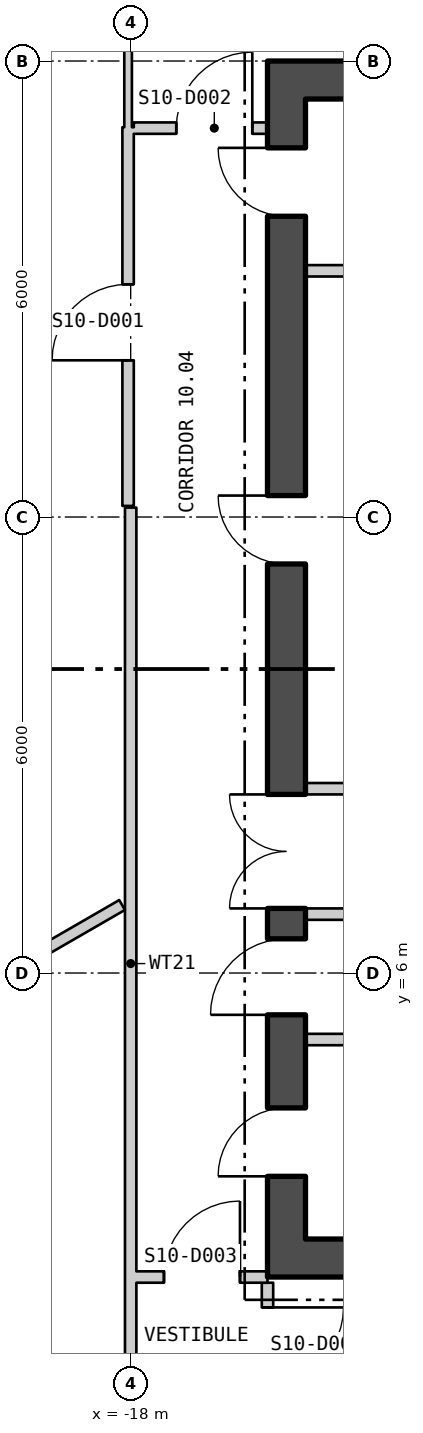
"""IFC4 building model, lengths in metres.
Left out: names, types, materials, properties, quantities, classifications, styles, units other than length and angle.
Written with IfcOpenShell. Run it as: python <this file> out.ifc"""

import sys

from ifc_helpers import new_model, si_unit, direction, frame, frame_2d, origin, place, context, subcontext, project, spatial, polyline, rectangle, outline, extrude, element, fill, save


model = new_model("IFC4")
c1 = context("Model", 3, precision=1e-05, world=origin(), true_north=direction((0.0, 1.0)))
c2 = subcontext(c1, "Body", "Model", "MODEL_VIEW")
j1 = project(units=[si_unit("LENGTHUNIT", "METRE"), si_unit("PLANEANGLEUNIT", "RADIAN")], contexts=[c1])
p1 = place(None, origin())
s1 = spatial("IfcSite", under=j1, at=p1, CompositionType="ELEMENT")
p2 = place(p1, origin())
s2 = spatial("IfcBuilding", under=s1, at=p2, CompositionType="ELEMENT")
p3 = place(p2, frame((0.0, 0.0, 139.8)))
s3 = spatial("IfcBuildingStorey", under=s2, at=p3, CompositionType="ELEMENT", Elevation=139.8)
p4 = place(p3, frame((-27.235, 12.423, -0.18), z_axis=(0.0, 0.0, 1.0), x_axis=(0.500000335318, -0.866025210188, 0.0)))
e1 = element("IfcWall", 1, at=p4, inside=s3, PredefinedType="SOLIDWALL", context=c2, shape_type="SweptSolid", body=[
    extrude(outline(polyline([(-0.13, -0.225), (45.88, -0.225), (45.62, 0.225), (0.13, 0.225), (-0.13, -0.225)])), origin(), (0.0, 0.0, 1.0), 3.68),
])
p5 = place(p4, frame((1.425, 0.0, 1.08)))
e2 = element("IfcOpeningElement", 2, at=p5, cuts=e1, PredefinedType="OPENING", context=c2, shape_type="SweptSolid", body=[
    extrude(rectangle(XDim=2.4, YDim=2.0, at=frame_2d((1.2, 1.0))), frame((0.0, 0.235, 0.0), z_axis=(0.0, -1.0, 0.0), x_axis=(1.0, 0.0, 0.0)), (0.0, 0.0, 1.0), 0.47),
])
p6 = place(p4, frame((5.895, 0.0, 1.08)))
e3 = element("IfcOpeningElement", 3, at=p6, cuts=e1, PredefinedType="OPENING", context=c2, shape_type="SweptSolid", body=[
    extrude(rectangle(XDim=2.4, YDim=2.0, at=frame_2d((1.2, 1.0))), frame((0.0, 0.235, 0.0), z_axis=(0.0, -1.0, 0.0), x_axis=(1.0, 0.0, 0.0)), (0.0, 0.0, 1.0), 0.47),
])
p7 = place(p4, frame((10.403, 0.0, 1.08)))
e4 = element("IfcOpeningElement", 4, at=p7, cuts=e1, PredefinedType="OPENING", context=c2, shape_type="SweptSolid", body=[
    extrude(rectangle(XDim=2.4, YDim=2.0, at=frame_2d((1.2, 1.0))), frame((0.0, 0.235, 0.0), z_axis=(0.0, -1.0, 0.0), x_axis=(1.0, 0.0, 0.0)), (0.0, 0.0, 1.0), 0.47),
])
p8 = place(p4, frame((14.912, 0.0, 1.08)))
e5 = element("IfcOpeningElement", 5, at=p8, cuts=e1, PredefinedType="OPENING", context=c2, shape_type="SweptSolid", body=[
    extrude(rectangle(XDim=2.4, YDim=2.0, at=frame_2d((1.2, 1.0))), frame((0.0, 0.235, 0.0), z_axis=(0.0, -1.0, 0.0), x_axis=(1.0, 0.0, 0.0)), (0.0, 0.0, 1.0), 0.47),
])
p9 = place(p4, frame((19.421, 0.0, 1.08)))
e6 = element("IfcOpeningElement", 6, at=p9, cuts=e1, PredefinedType="OPENING", context=c2, shape_type="SweptSolid", body=[
    extrude(rectangle(XDim=2.4, YDim=2.0, at=frame_2d((1.2, 1.0))), frame((0.0, 0.235, 0.0), z_axis=(0.0, -1.0, 0.0), x_axis=(1.0, 0.0, 0.0)), (0.0, 0.0, 1.0), 0.47),
])
p10 = place(p4, frame((23.929, 0.0, 1.08)))
e7 = element("IfcOpeningElement", 7, at=p10, cuts=e1, PredefinedType="OPENING", context=c2, shape_type="SweptSolid", body=[
    extrude(rectangle(XDim=2.4, YDim=2.0, at=frame_2d((1.2, 1.0))), frame((0.0, 0.235, 0.0), z_axis=(0.0, -1.0, 0.0), x_axis=(1.0, 0.0, 0.0)), (0.0, 0.0, 1.0), 0.47),
])
p11 = place(p4, frame((28.438, 0.0, 1.08)))
e8 = element("IfcOpeningElement", 8, at=p11, cuts=e1, PredefinedType="OPENING", context=c2, shape_type="SweptSolid", body=[
    extrude(rectangle(XDim=2.4, YDim=2.0, at=frame_2d((1.2, 1.0))), frame((0.0, 0.235, 0.0), z_axis=(0.0, -1.0, 0.0), x_axis=(1.0, 0.0, 0.0)), (0.0, 0.0, 1.0), 0.47),
])
p12 = place(p4, frame((32.947, 0.0, 1.08)))
e9 = element("IfcOpeningElement", 9, at=p12, cuts=e1, PredefinedType="OPENING", context=c2, shape_type="SweptSolid", body=[
    extrude(rectangle(XDim=2.4, YDim=2.0, at=frame_2d((1.2, 1.0))), frame((0.0, 0.235, 0.0), z_axis=(0.0, -1.0, 0.0), x_axis=(1.0, 0.0, 0.0)), (0.0, 0.0, 1.0), 0.47),
])
p13 = place(p4, frame((37.455, 0.0, 1.08)))
e10 = element("IfcOpeningElement", 10, at=p13, cuts=e1, PredefinedType="OPENING", context=c2, shape_type="SweptSolid", body=[
    extrude(rectangle(XDim=2.4, YDim=2.0, at=frame_2d((1.2, 1.0))), frame((0.0, 0.235, 0.0), z_axis=(0.0, -1.0, 0.0), x_axis=(1.0, 0.0, 0.0)), (0.0, 0.0, 1.0), 0.47),
])
p14 = place(p4, frame((41.925, 0.0, 1.08)))
e11 = element("IfcOpeningElement", 11, at=p14, cuts=e1, PredefinedType="OPENING", context=c2, shape_type="SweptSolid", body=[
    extrude(rectangle(XDim=2.4, YDim=2.0, at=frame_2d((1.2, 1.0))), frame((0.0, 0.235, 0.0), z_axis=(0.0, -1.0, 0.0), x_axis=(1.0, 0.0, 0.0)), (0.0, 0.0, 1.0), 0.47),
])
p15 = place(p3, frame((-16.2, 2.25, 0.0), z_axis=(0.0, 0.0, 1.0), x_axis=(1.0, 0.0, 0.0)))
e12 = element("IfcWall", 12, at=p15, inside=s3, PredefinedType="SHEAR", context=c2, shape_type="SweptSolid", body=[
    extrude(rectangle(XDim=32.4, YDim=0.5, at=frame_2d((16.2, 0.0))), origin(), (0.0, 0.0, 1.0), 3.7),
])
p16 = place(p15, frame((10.7, 0.0, 0.0)))
e13 = element("IfcOpeningElement", 13, at=p16, cuts=e12, PredefinedType="OPENING", context=c2, shape_type="SweptSolid", body=[
    extrude(rectangle(XDim=1.8, YDim=2.4, at=frame_2d((0.9, 1.2))), frame((0.0, 0.26, 0.0), z_axis=(0.0, -1.0, 0.0), x_axis=(1.0, 0.0, 0.0)), (0.0, 0.0, 1.0), 0.52),
])
p17 = place(p15, frame((20.7, 0.0, 0.0)))
e14 = element("IfcOpeningElement", 14, at=p17, cuts=e12, PredefinedType="OPENING", context=c2, shape_type="SweptSolid", body=[
    extrude(rectangle(XDim=1.8, YDim=2.4, at=frame_2d((0.9, 1.2))), frame((0.0, 0.26, 0.0), z_axis=(0.0, -1.0, 0.0), x_axis=(1.0, 0.0, 0.0)), (0.0, 0.0, 1.0), 0.52),
])
p18 = place(p3, frame((-16.2, 17.75, 0.0), z_axis=(0.0, 0.0, 1.0), x_axis=(1.0, 0.0, 0.0)))
e15 = element("IfcWall", 15, at=p18, inside=s3, PredefinedType="SHEAR", context=c2, shape_type="SweptSolid", body=[
    extrude(rectangle(XDim=32.4, YDim=0.5, at=frame_2d((16.2, 0.0))), origin(), (0.0, 0.0, 1.0), 3.7),
])
p19 = place(p3, frame((-15.95, 2.5, 0.0), z_axis=(0.0, 0.0, 1.0), x_axis=(0.0, 1.0, 0.0)))
e16 = element("IfcWall", 16, at=p19, inside=s3, PredefinedType="SHEAR", context=c2, shape_type="SweptSolid", body=[
    extrude(rectangle(XDim=15.0, YDim=0.5, at=frame_2d((7.5, 0.0))), origin(), (0.0, 0.0, 1.0), 3.7),
])
p20 = place(p19, frame((4.35, 0.0, 0.0)))
e17 = element("IfcOpeningElement", 17, at=p20, cuts=e16, PredefinedType="OPENING", context=c2, shape_type="SweptSolid", body=[
    extrude(rectangle(XDim=1.5, YDim=2.1, at=frame_2d((0.75, 1.05))), frame((0.0, 0.26, 0.0), z_axis=(0.0, -1.0, 0.0), x_axis=(1.0, 0.0, 0.0)), (0.0, 0.0, 1.0), 0.52),
])
p21 = place(p19, frame((0.825, 0.0, 0.0)))
e18 = element("IfcOpeningElement", 18, at=p21, cuts=e16, PredefinedType="OPENING", context=c2, shape_type="SweptSolid", body=[
    extrude(rectangle(XDim=0.9, YDim=2.1, at=frame_2d((0.45, 1.05))), frame((0.0, 0.26, 0.0), z_axis=(0.0, -1.0, 0.0), x_axis=(1.0, 0.0, 0.0)), (0.0, 0.0, 1.0), 0.52),
])
p22 = place(p19, frame((2.95, 0.0, 0.0)))
e19 = element("IfcOpeningElement", 19, at=p22, cuts=e16, PredefinedType="OPENING", context=c2, shape_type="SweptSolid", body=[
    extrude(rectangle(XDim=1.0, YDim=2.1, at=frame_2d((0.5, 1.05))), frame((0.0, 0.26, 0.0), z_axis=(0.0, -1.0, 0.0), x_axis=(1.0, 0.0, 0.0)), (0.0, 0.0, 1.0), 0.52),
])
p23 = place(p19, frame((8.882, 0.0, 0.0)))
e20 = element("IfcOpeningElement", 20, at=p23, cuts=e16, PredefinedType="OPENING", context=c2, shape_type="SweptSolid", body=[
    extrude(rectangle(XDim=0.9, YDim=2.1, at=frame_2d((0.45, 1.05))), frame((0.0, 0.26, 0.0), z_axis=(0.0, -1.0, 0.0), x_axis=(1.0, 0.0, 0.0)), (0.0, 0.0, 1.0), 0.52),
])
p24 = place(p19, frame((13.457, 0.0, 0.0)))
e21 = element("IfcOpeningElement", 21, at=p24, cuts=e16, PredefinedType="OPENING", context=c2, shape_type="SweptSolid", body=[
    extrude(rectangle(XDim=0.9, YDim=2.1, at=frame_2d((0.45, 1.05))), frame((0.0, 0.26, 0.0), z_axis=(0.0, -1.0, 0.0), x_axis=(1.0, 0.0, 0.0)), (0.0, 0.0, 1.0), 0.52),
])
for number, where, z_axis, x_axis in (
    (22, (-15.7, 6.775, 0.0), (0.0, 0.0, 1.0), (1.0, 0.0, 0.0)),
    (23, (-15.7, 8.425, 0.0), (0.0, 0.0, 1.0), (1.0, 0.0, 0.0)),
    (24, (-15.7, 5.125, 0.0), (0.0, 0.0, 1.0), (1.0, 0.0, 0.0)),
    (25, (-15.7, 15.24, 0.0), (0.0, 0.0, 1.0), (1.0, 0.0, 0.0)),
):
    element("IfcWall", number, at=place(p3, frame(where, z_axis=z_axis, x_axis=x_axis)), inside=s3, PredefinedType="PARTITIONING", context=c2, shape_type="SweptSolid", body=[
        extrude(rectangle(XDim=1.2, YDim=0.15, at=frame_2d((0.6, 0.0))), origin(), (0.0, 0.0, 1.0), 3.7),
    ])
p25 = place(p3, frame((-21.976, 4.664, 0.0), z_axis=(0.0, 0.0, 1.0), x_axis=(0.865957845807, 0.500116995598, 0.0)))
e26 = element("IfcWall", 26, at=p25, inside=s3, PredefinedType="PARTITIONING", context=c2, shape_type="SweptSolid", body=[
    extrude(rectangle(XDim=4.461, YDim=0.15, at=frame_2d((2.231, 0.0))), origin(), (0.0, 0.0, 1.0), 3.7),
])
p26 = place(p3, frame((-18.034, 12.146, 0.0), z_axis=(0.0, 0.0, 1.0), x_axis=(0.0, 1.0, 0.0)))
e27 = element("IfcWall", 27, at=p26, inside=s3, PredefinedType="PARTITIONING", context=c2, shape_type="SweptSolid", body=[
    extrude(rectangle(XDim=4.983, YDim=0.15, at=frame_2d((2.491, 0.0))), origin(), (0.0, 0.0, 1.0), 3.7),
])
p27 = place(p26, frame((1.916, 0.0, 0.0)))
e28 = element("IfcOpeningElement", 28, at=p27, cuts=e27, PredefinedType="OPENING", context=c2, shape_type="SweptSolid", body=[
    extrude(rectangle(XDim=1.0, YDim=2.1, at=frame_2d((0.5, 1.05))), frame((0.0, 0.085, 0.0), z_axis=(0.0, -1.0, 0.0), x_axis=(1.0, 0.0, 0.0)), (0.0, 0.0, 1.0), 0.17),
])
p28 = place(p3, frame((-18.034, 17.129, 0.0), z_axis=(0.0, 0.0, 1.0), x_axis=(0.0, 1.0, 0.0)))
e29 = element("IfcWall", 29, at=p28, inside=s3, PredefinedType="PARTITIONING", context=c2, shape_type="SweptSolid", body=[
    extrude(rectangle(XDim=2.171, YDim=0.1, at=frame_2d((1.085, 0.0))), origin(), (0.0, 0.0, 1.0), 3.7),
])
p29 = place(p3, frame((-18.0, 0.125, 0.0), z_axis=(0.0, 0.0, 1.0), x_axis=(0.0, 1.0, 0.0)))
e30 = element("IfcWall", 30, at=p29, inside=s3, PredefinedType="PARTITIONING", context=c2, shape_type="SweptSolid", body=[
    extrude(rectangle(XDim=11.999, YDim=0.15, at=frame_2d((6.0, 0.0))), origin(), (0.0, 0.0, 1.0), 3.7),
])
p30 = place(p3, frame((-17.959, 17.117, 0.0), z_axis=(0.0, 0.0, 1.0), x_axis=(1.0, 0.0, 0.0)))
e31 = element("IfcWall", 31, at=p30, inside=s3, PredefinedType="PARTITIONING", context=c2, shape_type="SweptSolid", body=[
    extrude(rectangle(XDim=1.759, YDim=0.15, at=frame_2d((0.879, 0.0))), origin(), (0.0, 0.0, 1.0), 3.7),
])
p31 = place(p30, frame((0.559, 0.0, 0.0)))
e32 = element("IfcOpeningElement", 32, at=p31, cuts=e31, PredefinedType="OPENING", context=c2, shape_type="SweptSolid", body=[
    extrude(rectangle(XDim=1.0, YDim=2.1, at=frame_2d((0.5, 1.05))), frame((0.0, 0.085, 0.0), z_axis=(0.0, -1.0, 0.0), x_axis=(1.0, 0.0, 0.0)), (0.0, 0.0, 1.0), 0.17),
])
p32 = place(p3, frame((-17.925, 2.0, 0.0), z_axis=(0.0, 0.0, 1.0), x_axis=(1.0, 0.0, 0.0)))
e33 = element("IfcWall", 33, at=p32, inside=s3, PredefinedType="PARTITIONING", context=c2, shape_type="SweptSolid", body=[
    extrude(rectangle(XDim=1.725, YDim=0.15, at=frame_2d((0.863, 0.0))), origin(), (0.0, 0.0, 1.0), 3.11),
])
p33 = place(p32, frame((0.363, 0.0, 0.0)))
e34 = element("IfcOpeningElement", 34, at=p33, cuts=e33, PredefinedType="OPENING", context=c2, shape_type="SweptSolid", body=[
    extrude(rectangle(XDim=1.0, YDim=2.1, at=frame_2d((0.5, 1.05))), frame((0.0, 0.085, 0.0), z_axis=(0.0, -1.0, 0.0), x_axis=(1.0, 0.0, 0.0)), (0.0, 0.0, 1.0), 0.17),
])
p34 = place(p3, frame((-16.2, 0.275, 0.0), z_axis=(0.0, 0.0, 1.0), x_axis=(0.0, 1.0, 0.0)))
e35 = element("IfcWall", 35, at=p34, inside=s3, PredefinedType="PARTITIONING", context=c2, shape_type="SweptSolid", body=[
    extrude(rectangle(XDim=1.65, YDim=0.15, at=frame_2d((0.825, 0.0))), origin(), (0.0, 0.0, 1.0), 3.7),
])
p35 = place(p34, frame((0.325, 0.0, 0.0)))
e36 = element("IfcOpeningElement", 36, at=p35, cuts=e35, PredefinedType="OPENING", context=c2, shape_type="SweptSolid", body=[
    extrude(rectangle(XDim=1.0, YDim=2.1, at=frame_2d((0.5, 1.05))), frame((0.0, 0.085, 0.0), z_axis=(0.0, -1.0, 0.0), x_axis=(1.0, 0.0, 0.0)), (0.0, 0.0, 1.0), 0.17),
])
p36 = place(p20, origin())
e37 = element("IfcDoor", 37, at=p36, inside=s3, OperationType="DOUBLE_DOOR_SINGLE_SWING", PredefinedType="DOOR", context=c2, shape_type="SweptSolid", body=[
    extrude(rectangle(XDim=1.5, YDim=2.1, at=frame_2d((0.75, 1.05))), frame((0.0, 0.025, 0.0), z_axis=(0.0, -1.0, 0.0), x_axis=(1.0, 0.0, 0.0)), (0.0, 0.0, 1.0), 0.05),
])
fill(e17, e37)
p37 = place(p21, origin())
e38 = element("IfcDoor", 38, at=p37, inside=s3, OperationType="SINGLE_SWING_RIGHT", PredefinedType="DOOR", context=c2, shape_type="SweptSolid", body=[
    extrude(rectangle(XDim=0.9, YDim=2.1, at=frame_2d((0.45, 1.05))), frame((0.0, 0.025, 0.0), z_axis=(0.0, -1.0, 0.0), x_axis=(1.0, 0.0, 0.0)), (0.0, 0.0, 1.0), 0.05),
])
fill(e18, e38)
p38 = place(p22, origin())
e39 = element("IfcDoor", 39, at=p38, inside=s3, OperationType="SINGLE_SWING_RIGHT", PredefinedType="DOOR", context=c2, shape_type="SweptSolid", body=[
    extrude(rectangle(XDim=1.0, YDim=2.1, at=frame_2d((0.5, 1.05))), frame((0.0, 0.025, 0.0), z_axis=(0.0, -1.0, 0.0), x_axis=(1.0, 0.0, 0.0)), (0.0, 0.0, 1.0), 0.05),
])
fill(e19, e39)
p39 = place(p23, origin())
e40 = element("IfcDoor", 40, at=p39, inside=s3, OperationType="SINGLE_SWING_LEFT", PredefinedType="DOOR", context=c2, shape_type="SweptSolid", body=[
    extrude(rectangle(XDim=0.9, YDim=2.1, at=frame_2d((0.45, 1.05))), frame((0.0, 0.025, 0.0), z_axis=(0.0, -1.0, 0.0), x_axis=(1.0, 0.0, 0.0)), (0.0, 0.0, 1.0), 0.05),
])
fill(e20, e40)
p40 = place(p24, origin())
e41 = element("IfcDoor", 41, at=p40, inside=s3, OperationType="SINGLE_SWING_LEFT", PredefinedType="DOOR", context=c2, shape_type="SweptSolid", body=[
    extrude(rectangle(XDim=0.9, YDim=2.1, at=frame_2d((0.45, 1.05))), frame((0.0, 0.025, 0.0), z_axis=(0.0, -1.0, 0.0), x_axis=(1.0, 0.0, 0.0)), (0.0, 0.0, 1.0), 0.05),
])
fill(e21, e41)
p41 = place(p27, origin())
e42 = element("IfcDoor", 42, at=p41, inside=s3, OperationType="SINGLE_SWING_RIGHT", PredefinedType="DOOR", context=c2, shape_type="SweptSolid", body=[
    extrude(rectangle(XDim=1.0, YDim=2.1, at=frame_2d((0.5, 1.05))), frame((0.0, 0.025, 0.0), z_axis=(0.0, -1.0, 0.0), x_axis=(1.0, 0.0, 0.0)), (0.0, 0.0, 1.0), 0.05),
])
fill(e28, e42)
p42 = place(p31, origin())
e43 = element("IfcDoor", 43, at=p42, inside=s3, OperationType="SINGLE_SWING_LEFT", PredefinedType="DOOR", context=c2, shape_type="SweptSolid", body=[
    extrude(rectangle(XDim=1.0, YDim=2.1, at=frame_2d((0.5, 1.05))), frame((0.0, 0.025, 0.0), z_axis=(0.0, -1.0, 0.0), x_axis=(1.0, 0.0, 0.0)), (0.0, 0.0, 1.0), 0.05),
])
fill(e32, e43)
p43 = place(p33, origin())
e44 = element("IfcDoor", 44, at=p43, inside=s3, OperationType="SINGLE_SWING_LEFT", PredefinedType="DOOR", context=c2, shape_type="SweptSolid", body=[
    extrude(rectangle(XDim=1.0, YDim=2.1, at=frame_2d((0.5, 1.05))), frame((0.0, 0.025, 0.0), z_axis=(0.0, -1.0, 0.0), x_axis=(1.0, 0.0, 0.0)), (0.0, 0.0, 1.0), 0.05),
])
fill(e34, e44)
p44 = place(p35, origin())
e45 = element("IfcDoor", 45, at=p44, inside=s3, OperationType="SINGLE_SWING_RIGHT", PredefinedType="DOOR", context=c2, shape_type="SweptSolid", body=[
    extrude(rectangle(XDim=1.0, YDim=2.1, at=frame_2d((0.5, 1.05))), frame((0.0, 0.025, 0.0), z_axis=(0.0, -1.0, 0.0), x_axis=(1.0, 0.0, 0.0)), (0.0, 0.0, 1.0), 0.05),
])
fill(e36, e45)
save(model, sys.argv[1])
